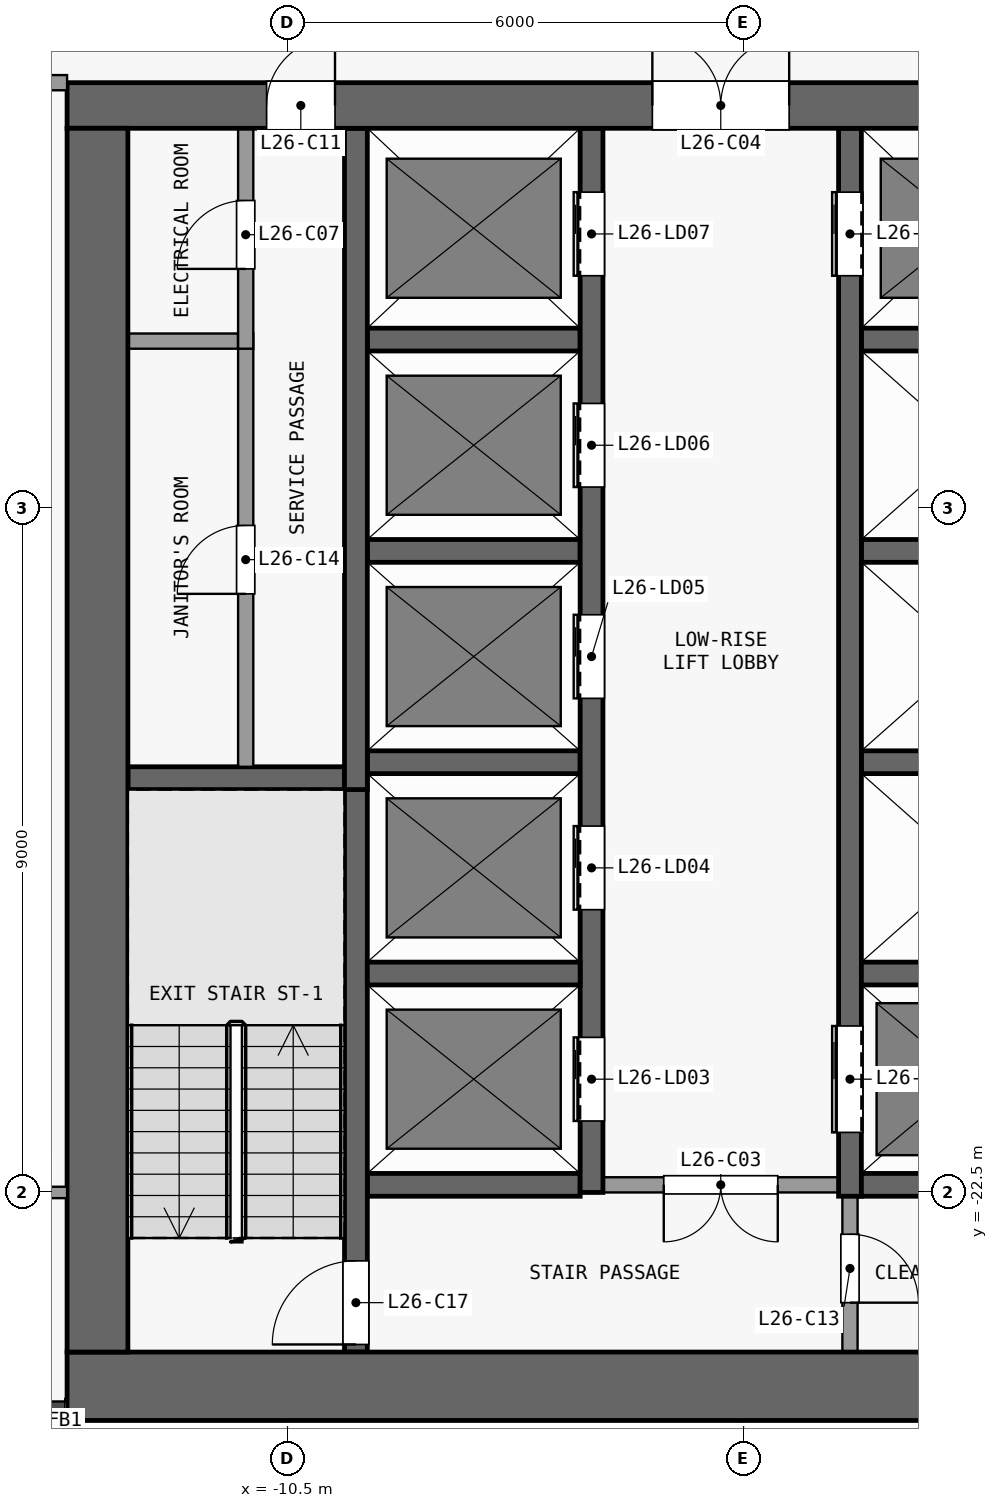
"""IFC4 building model, lengths in metres.
Left out: names, types, materials, properties, quantities, classifications, styles, units other than length and angle.
Written with IfcOpenShell. Run it as: python <this file> out.ifc"""

import sys

from ifc_helpers import new_model, si_unit, direction, frame, frame_2d, origin, place, context, subcontext, project, spatial, rectangle, extrude, element, fill, save


model = new_model("IFC4")
c1 = context("Model", 3, precision=1e-05, world=origin(), true_north=direction((0.0, 1.0)))
c2 = subcontext(c1, "Body", "Model", "MODEL_VIEW")
j1 = project(units=[si_unit("LENGTHUNIT", "METRE"), si_unit("PLANEANGLEUNIT", "RADIAN")], contexts=[c1])
p1 = place(None, origin())
s1 = spatial("IfcSite", under=j1, at=p1, CompositionType="ELEMENT")
p2 = place(p1, origin())
s2 = spatial("IfcBuilding", under=s1, at=p2, CompositionType="ELEMENT")
p3 = place(p2, frame((0.0, 0.0, 106.3)))
s3 = spatial("IfcBuildingStorey", under=s2, at=p3, CompositionType="ELEMENT", Elevation=106.3)
p4 = place(p3, frame((-13.4, -25.05, 0.0), z_axis=(0.0, 0.0, 1.0), x_axis=(1.0, 0.0, 0.0)))
e1 = element("IfcWall", 1, at=p4, inside=s3, PredefinedType="SHEAR", context=c2, shape_type="SweptSolid", body=[
    extrude(rectangle(XDim=26.8, YDim=0.9, at=frame_2d((13.4, 0.0))), origin(), (0.0, 0.0, 1.0), 3.3),
])
p5 = place(p3, frame((-13.4, -8.2, 0.0), z_axis=(0.0, 0.0, 1.0), x_axis=(1.0, 0.0, 0.0)))
e2 = element("IfcWall", 2, at=p5, inside=s3, PredefinedType="SHEAR", context=c2, shape_type="SweptSolid", body=[
    extrude(rectangle(XDim=26.8, YDim=0.6, at=frame_2d((13.4, 0.0))), origin(), (0.0, 0.0, 1.0), 3.3),
])
p6 = place(p5, frame((7.7, 0.0, 0.0)))
e3 = element("IfcOpeningElement", 3, at=p6, cuts=e2, PredefinedType="OPENING", context=c2, shape_type="SweptSolid", body=[
    extrude(rectangle(XDim=1.8, YDim=2.1, at=frame_2d((0.9, 1.05))), frame((0.0, 0.31, 0.0), z_axis=(0.0, -1.0, 0.0), x_axis=(1.0, 0.0, 0.0)), (0.0, 0.0, 1.0), 0.62),
])
p7 = place(p5, frame((17.3, 0.0, 0.0)))
e4 = element("IfcOpeningElement", 4, at=p7, cuts=e2, PredefinedType="OPENING", context=c2, shape_type="SweptSolid", body=[
    extrude(rectangle(XDim=1.8, YDim=2.1, at=frame_2d((0.9, 1.05))), frame((0.0, 0.31, 0.0), z_axis=(0.0, -1.0, 0.0), x_axis=(1.0, 0.0, 0.0)), (0.0, 0.0, 1.0), 0.62),
])
p8 = place(p5, frame((2.625, 0.0, 0.0)))
e5 = element("IfcOpeningElement", 5, at=p8, cuts=e2, PredefinedType="OPENING", context=c2, shape_type="SweptSolid", body=[
    extrude(rectangle(XDim=0.9, YDim=2.1, at=frame_2d((0.45, 1.05))), frame((0.0, 0.31, 0.0), z_axis=(0.0, -1.0, 0.0), x_axis=(1.0, 0.0, 0.0)), (0.0, 0.0, 1.0), 0.62),
])
p9 = place(p5, frame((23.275, 0.0, 0.0)))
e6 = element("IfcOpeningElement", 6, at=p9, cuts=e2, PredefinedType="OPENING", context=c2, shape_type="SweptSolid", body=[
    extrude(rectangle(XDim=0.9, YDim=2.1, at=frame_2d((0.45, 1.05))), frame((0.0, 0.31, 0.0), z_axis=(0.0, -1.0, 0.0), x_axis=(1.0, 0.0, 0.0)), (0.0, 0.0, 1.0), 0.62),
])
p10 = place(p3, frame((-13.0, -24.6, 0.0), z_axis=(0.0, 0.0, 1.0), x_axis=(0.0, 1.0, 0.0)))
e7 = element("IfcWall", 7, at=p10, inside=s3, PredefinedType="SHEAR", context=c2, shape_type="SweptSolid", body=[
    extrude(rectangle(XDim=16.1, YDim=0.8, at=frame_2d((8.05, 0.0))), origin(), (0.0, 0.0, 1.0), 3.3),
])
p11 = place(p3, frame((-9.45, -22.4, 0.0), z_axis=(0.0, 0.0, 1.0), x_axis=(1.0, 0.0, 0.0)))
e8 = element("IfcWall", 8, at=p11, inside=s3, PredefinedType="SHEAR", context=c2, shape_type="SweptSolid", body=[
    extrude(rectangle(XDim=2.8, YDim=0.3, at=frame_2d((1.4, 0.0))), origin(), (0.0, 0.0, 1.0), 3.3),
])
p12 = place(p3, frame((-3.25, -22.4, 0.0), z_axis=(0.0, 0.0, 1.0), x_axis=(-1.0, 0.0, 0.0)))
e9 = element("IfcWall", 9, at=p12, inside=s3, PredefinedType="PARTITIONING", context=c2, shape_type="SweptSolid", body=[
    extrude(rectangle(XDim=3.1, YDim=0.2, at=frame_2d((1.55, 0.0))), origin(), (0.0, 0.0, 1.0), 3.3),
])
p13 = place(p12, frame((0.8, 0.0, 0.0)))
e10 = element("IfcOpeningElement", 10, at=p13, cuts=e9, PredefinedType="OPENING", context=c2, shape_type="SweptSolid", body=[
    extrude(rectangle(XDim=1.5, YDim=2.1, at=frame_2d((0.75, 1.05))), frame((0.0, 0.11, 0.0), z_axis=(0.0, -1.0, 0.0), x_axis=(1.0, 0.0, 0.0)), (0.0, 0.0, 1.0), 0.22),
])
p14 = place(p3, frame((-2.95, -22.4, 0.0), z_axis=(0.0, 0.0, 1.0), x_axis=(1.0, 0.0, 0.0)))
e11 = element("IfcWall", 11, at=p14, inside=s3, PredefinedType="SHEAR", context=c2, shape_type="SweptSolid", body=[
    extrude(rectangle(XDim=6.2, YDim=0.3, at=frame_2d((3.1, 0.0))), origin(), (0.0, 0.0, 1.0), 3.3),
])
for number, where, z_axis, x_axis in (
    (12, (-9.45, -19.62, 0.0), (0.0, 0.0, 1.0), (1.0, 0.0, 0.0)),
    (13, (-2.95, -19.62, 0.0), (0.0, 0.0, 1.0), (1.0, 0.0, 0.0)),
):
    element("IfcWall", number, at=place(p3, frame(where, z_axis=z_axis, x_axis=x_axis)), inside=s3, PredefinedType="SHEAR", context=c2, shape_type="SweptSolid", body=[
        extrude(rectangle(XDim=2.8, YDim=0.3, at=frame_2d((1.4, 0.0))), origin(), (0.0, 0.0, 1.0), 3.3),
    ])
p15 = place(p3, frame((-12.6, -17.05, 0.0), z_axis=(0.0, 0.0, 1.0), x_axis=(1.0, 0.0, 0.0)))
e14 = element("IfcWall", 14, at=p15, inside=s3, PredefinedType="SHEAR", context=c2, shape_type="SweptSolid", body=[
    extrude(rectangle(XDim=2.85, YDim=0.3, at=frame_2d((1.425, 0.0))), origin(), (0.0, 0.0, 1.0), 3.3),
])
for number, where, z_axis, x_axis in (
    (15, (-9.45, -16.84, 0.0), (0.0, 0.0, 1.0), (1.0, 0.0, 0.0)),
    (16, (-2.95, -16.84, 0.0), (0.0, 0.0, 1.0), (1.0, 0.0, 0.0)),
    (17, (-9.45, -14.06, 0.0), (0.0, 0.0, 1.0), (1.0, 0.0, 0.0)),
    (18, (-2.95, -14.06, 0.0), (0.0, 0.0, 1.0), (1.0, 0.0, 0.0)),
):
    element("IfcWall", number, at=place(p3, frame(where, z_axis=z_axis, x_axis=x_axis)), inside=s3, PredefinedType="SHEAR", context=c2, shape_type="SweptSolid", body=[
        extrude(rectangle(XDim=2.8, YDim=0.3, at=frame_2d((1.4, 0.0))), origin(), (0.0, 0.0, 1.0), 3.3),
    ])
p16 = place(p3, frame((-12.6, -11.3, 0.0), z_axis=(0.0, 0.0, 1.0), x_axis=(1.0, 0.0, 0.0)))
e19 = element("IfcWall", 19, at=p16, inside=s3, PredefinedType="PARTITIONING", context=c2, shape_type="SweptSolid", body=[
    extrude(rectangle(XDim=1.45, YDim=0.2, at=frame_2d((0.725, 0.0))), origin(), (0.0, 0.0, 1.0), 3.3),
])
for number, where, z_axis, x_axis in (
    (20, (-9.45, -11.28, 0.0), (0.0, 0.0, 1.0), (1.0, 0.0, 0.0)),
    (21, (-2.95, -11.28, 0.0), (0.0, 0.0, 1.0), (1.0, 0.0, 0.0)),
):
    element("IfcWall", number, at=place(p3, frame(where, z_axis=z_axis, x_axis=x_axis)), inside=s3, PredefinedType="SHEAR", context=c2, shape_type="SweptSolid", body=[
        extrude(rectangle(XDim=2.8, YDim=0.3, at=frame_2d((1.4, 0.0))), origin(), (0.0, 0.0, 1.0), 3.3),
    ])
p17 = place(p3, frame((-11.05, -16.9, 0.0), z_axis=(0.0, 0.0, 1.0), x_axis=(0.0, 1.0, 0.0)))
e22 = element("IfcWall", 22, at=p17, inside=s3, PredefinedType="PARTITIONING", context=c2, shape_type="SweptSolid", body=[
    extrude(rectangle(XDim=5.7, YDim=0.2, at=frame_2d((2.85, 0.0))), origin(), (0.0, 0.0, 1.0), 3.3),
])
p18 = place(p17, frame((2.275, 0.0, 0.0)))
e23 = element("IfcOpeningElement", 23, at=p18, cuts=e22, PredefinedType="OPENING", context=c2, shape_type="SweptSolid", body=[
    extrude(rectangle(XDim=0.9, YDim=2.1, at=frame_2d((0.45, 1.05))), frame((0.0, 0.11, 0.0), z_axis=(0.0, -1.0, 0.0), x_axis=(1.0, 0.0, 0.0)), (0.0, 0.0, 1.0), 0.22),
])
p19 = place(p3, frame((-11.05, -11.4, 0.0), z_axis=(0.0, 0.0, 1.0), x_axis=(0.0, 1.0, 0.0)))
e24 = element("IfcWall", 24, at=p19, inside=s3, PredefinedType="PARTITIONING", context=c2, shape_type="SweptSolid", body=[
    extrude(rectangle(XDim=2.9, YDim=0.2, at=frame_2d((1.45, 0.0))), origin(), (0.0, 0.0, 1.0), 3.3),
])
p20 = place(p19, frame((1.05, 0.0, 0.0)))
e25 = element("IfcOpeningElement", 25, at=p20, cuts=e24, PredefinedType="OPENING", context=c2, shape_type="SweptSolid", body=[
    extrude(rectangle(XDim=0.9, YDim=2.1, at=frame_2d((0.45, 1.05))), frame((0.0, 0.11, 0.0), z_axis=(0.0, -1.0, 0.0), x_axis=(1.0, 0.0, 0.0)), (0.0, 0.0, 1.0), 0.22),
])
p21 = place(p3, frame((-9.6, -24.6, 0.0), z_axis=(0.0, 0.0, 1.0), x_axis=(0.0, 1.0, 0.0)))
e26 = element("IfcWall", 26, at=p21, inside=s3, PredefinedType="SHEAR", context=c2, shape_type="SweptSolid", body=[
    extrude(rectangle(XDim=7.7, YDim=0.3, at=frame_2d((3.85, 0.0))), origin(), (0.0, 0.0, 1.0), 3.3),
])
p22 = place(p21, frame((0.1, 0.0, 0.0)))
e27 = element("IfcOpeningElement", 27, at=p22, cuts=e26, PredefinedType="OPENING", context=c2, shape_type="SweptSolid", body=[
    extrude(rectangle(XDim=1.1, YDim=2.1, at=frame_2d((0.55, 1.05))), frame((0.0, 0.16, 0.0), z_axis=(0.0, -1.0, 0.0), x_axis=(1.0, 0.0, 0.0)), (0.0, 0.0, 1.0), 0.32),
])
p23 = place(p3, frame((-9.6, -17.2, 0.0), z_axis=(0.0, 0.0, 1.0), x_axis=(0.0, 1.0, 0.0)))
e28 = element("IfcWall", 28, at=p23, inside=s3, PredefinedType="SHEAR", context=c2, shape_type="SweptSolid", body=[
    extrude(rectangle(XDim=8.7, YDim=0.3, at=frame_2d((4.35, 0.0))), origin(), (0.0, 0.0, 1.0), 3.3),
])
p24 = place(p3, frame((-6.5, -22.5, 0.0), z_axis=(0.0, 0.0, 1.0), x_axis=(0.0, 1.0, 0.0)))
e29 = element("IfcWall", 29, at=p24, inside=s3, PredefinedType="SHEAR", context=c2, shape_type="SweptSolid", body=[
    extrude(rectangle(XDim=14.0, YDim=0.3, at=frame_2d((7.0, 0.0))), origin(), (0.0, 0.0, 1.0), 3.3),
])
p25 = place(p24, frame((0.94, 0.0, 0.0)))
e30 = element("IfcOpeningElement", 30, at=p25, cuts=e29, PredefinedType="OPENING", context=c2, shape_type="SweptSolid", body=[
    extrude(rectangle(XDim=1.1, YDim=2.1, at=frame_2d((0.55, 1.05))), frame((0.0, 0.16, 0.0), z_axis=(0.0, -1.0, 0.0), x_axis=(1.0, 0.0, 0.0)), (0.0, 0.0, 1.0), 0.32),
])
p26 = place(p24, frame((3.72, 0.0, 0.0)))
e31 = element("IfcOpeningElement", 31, at=p26, cuts=e29, PredefinedType="OPENING", context=c2, shape_type="SweptSolid", body=[
    extrude(rectangle(XDim=1.1, YDim=2.1, at=frame_2d((0.55, 1.05))), frame((0.0, 0.16, 0.0), z_axis=(0.0, -1.0, 0.0), x_axis=(1.0, 0.0, 0.0)), (0.0, 0.0, 1.0), 0.32),
])
p27 = place(p24, frame((6.5, 0.0, 0.0)))
e32 = element("IfcOpeningElement", 32, at=p27, cuts=e29, PredefinedType="OPENING", context=c2, shape_type="SweptSolid", body=[
    extrude(rectangle(XDim=1.1, YDim=2.1, at=frame_2d((0.55, 1.05))), frame((0.0, 0.16, 0.0), z_axis=(0.0, -1.0, 0.0), x_axis=(1.0, 0.0, 0.0)), (0.0, 0.0, 1.0), 0.32),
])
p28 = place(p24, frame((9.28, 0.0, 0.0)))
e33 = element("IfcOpeningElement", 33, at=p28, cuts=e29, PredefinedType="OPENING", context=c2, shape_type="SweptSolid", body=[
    extrude(rectangle(XDim=1.1, YDim=2.1, at=frame_2d((0.55, 1.05))), frame((0.0, 0.16, 0.0), z_axis=(0.0, -1.0, 0.0), x_axis=(1.0, 0.0, 0.0)), (0.0, 0.0, 1.0), 0.32),
])
p29 = place(p24, frame((12.06, 0.0, 0.0)))
e34 = element("IfcOpeningElement", 34, at=p29, cuts=e29, PredefinedType="OPENING", context=c2, shape_type="SweptSolid", body=[
    extrude(rectangle(XDim=1.1, YDim=2.1, at=frame_2d((0.55, 1.05))), frame((0.0, 0.16, 0.0), z_axis=(0.0, -1.0, 0.0), x_axis=(1.0, 0.0, 0.0)), (0.0, 0.0, 1.0), 0.32),
])
p30 = place(p3, frame((-3.1, -22.55, 0.0), z_axis=(0.0, 0.0, 1.0), x_axis=(0.0, -1.0, 0.0)))
e35 = element("IfcWall", 35, at=p30, inside=s3, PredefinedType="PARTITIONING", context=c2, shape_type="SweptSolid", body=[
    extrude(rectangle(XDim=2.05, YDim=0.2, at=frame_2d((1.025, 0.0))), origin(), (0.0, 0.0, 1.0), 3.3),
])
p31 = place(p30, frame((0.5, 0.0, 0.0)))
e36 = element("IfcOpeningElement", 36, at=p31, cuts=e35, PredefinedType="OPENING", context=c2, shape_type="SweptSolid", body=[
    extrude(rectangle(XDim=0.9, YDim=2.1, at=frame_2d((0.45, 1.05))), frame((0.0, 0.11, 0.0), z_axis=(0.0, -1.0, 0.0), x_axis=(1.0, 0.0, 0.0)), (0.0, 0.0, 1.0), 0.22),
])
p32 = place(p3, frame((-3.1, -22.55, 0.0), z_axis=(0.0, 0.0, 1.0), x_axis=(0.0, 1.0, 0.0)))
e37 = element("IfcWall", 37, at=p32, inside=s3, PredefinedType="SHEAR", context=c2, shape_type="SweptSolid", body=[
    extrude(rectangle(XDim=14.05, YDim=0.3, at=frame_2d((7.025, 0.0))), origin(), (0.0, 0.0, 1.0), 3.3),
])
p33 = place(p32, frame((12.11, 0.0, 0.0)))
e38 = element("IfcOpeningElement", 38, at=p33, cuts=e37, PredefinedType="OPENING", context=c2, shape_type="SweptSolid", body=[
    extrude(rectangle(XDim=1.1, YDim=2.1, at=frame_2d((0.55, 1.05))), frame((0.0, 0.16, 0.0), z_axis=(0.0, -1.0, 0.0), x_axis=(1.0, 0.0, 0.0)), (0.0, 0.0, 1.0), 0.32),
])
p34 = place(p32, frame((0.84, 0.0, 0.0)))
e39 = element("IfcOpeningElement", 39, at=p34, cuts=e37, PredefinedType="OPENING", context=c2, shape_type="SweptSolid", body=[
    extrude(rectangle(XDim=1.4, YDim=2.1, at=frame_2d((0.7, 1.05))), frame((0.0, 0.16, 0.0), z_axis=(0.0, -1.0, 0.0), x_axis=(1.0, 0.0, 0.0)), (0.0, 0.0, 1.0), 0.32),
])
p35 = place(p3, frame((-16.325, -22.5, 0.0), z_axis=(0.0, 0.0, 1.0), x_axis=(1.0, 0.0, 0.0)))
e40 = element("IfcWall", 40, at=p35, inside=s3, PredefinedType="PARTITIONING", context=c2, shape_type="SweptSolid", body=[
    extrude(rectangle(XDim=2.925, YDim=0.15, at=frame_2d((1.462, 0.0))), origin(), (0.0, 0.0, 1.0), 3.3),
])
p36 = place(p35, frame((1.0, 0.0, 0.0)))
e41 = element("IfcOpeningElement", 41, at=p36, cuts=e40, PredefinedType="OPENING", context=c2, shape_type="SweptSolid", body=[
    extrude(rectangle(XDim=0.9, YDim=2.1, at=frame_2d((0.45, 1.05))), frame((0.0, 0.085, 0.0), z_axis=(0.0, -1.0, 0.0), x_axis=(1.0, 0.0, 0.0)), (0.0, 0.0, 1.0), 0.17),
])
p37 = place(p3, frame((-25.25, -7.9, 0.0), z_axis=(0.0, 0.0, 1.0), x_axis=(1.0, 0.0, 0.0)))
e42 = element("IfcWall", 42, at=p37, inside=s3, PredefinedType="PARTITIONING", context=c2, shape_type="SweptSolid", body=[
    extrude(rectangle(XDim=11.85, YDim=0.2, at=frame_2d((5.925, 0.0))), origin(), (0.0, 0.0, 1.0), 3.3),
])
p38 = place(p37, frame((9.85, 0.0, 0.0)))
e43 = element("IfcOpeningElement", 43, at=p38, cuts=e42, PredefinedType="OPENING", context=c2, shape_type="SweptSolid", body=[
    extrude(rectangle(XDim=1.0, YDim=2.1, at=frame_2d((0.5, 1.05))), frame((0.0, 0.11, 0.0), z_axis=(0.0, -1.0, 0.0), x_axis=(1.0, 0.0, 0.0)), (0.0, 0.0, 1.0), 0.22),
])
p39 = place(p25, origin())
e44 = element("IfcDoor", 44, at=p39, inside=s3, OperationType="DOUBLE_DOOR_SLIDING", PredefinedType="DOOR", context=c2, shape_type="SweptSolid", body=[
    extrude(rectangle(XDim=1.1, YDim=2.1, at=frame_2d((0.55, 1.05))), frame((0.0, 0.025, 0.0), z_axis=(0.0, -1.0, 0.0), x_axis=(1.0, 0.0, 0.0)), (0.0, 0.0, 1.0), 0.05),
])
fill(e30, e44)
p40 = place(p26, origin())
e45 = element("IfcDoor", 45, at=p40, inside=s3, OperationType="DOUBLE_DOOR_SLIDING", PredefinedType="DOOR", context=c2, shape_type="SweptSolid", body=[
    extrude(rectangle(XDim=1.1, YDim=2.1, at=frame_2d((0.55, 1.05))), frame((0.0, 0.025, 0.0), z_axis=(0.0, -1.0, 0.0), x_axis=(1.0, 0.0, 0.0)), (0.0, 0.0, 1.0), 0.05),
])
fill(e31, e45)
p41 = place(p27, origin())
e46 = element("IfcDoor", 46, at=p41, inside=s3, OperationType="DOUBLE_DOOR_SLIDING", PredefinedType="DOOR", context=c2, shape_type="SweptSolid", body=[
    extrude(rectangle(XDim=1.1, YDim=2.1, at=frame_2d((0.55, 1.05))), frame((0.0, 0.025, 0.0), z_axis=(0.0, -1.0, 0.0), x_axis=(1.0, 0.0, 0.0)), (0.0, 0.0, 1.0), 0.05),
])
fill(e32, e46)
p42 = place(p28, origin())
e47 = element("IfcDoor", 47, at=p42, inside=s3, OperationType="DOUBLE_DOOR_SLIDING", PredefinedType="DOOR", context=c2, shape_type="SweptSolid", body=[
    extrude(rectangle(XDim=1.1, YDim=2.1, at=frame_2d((0.55, 1.05))), frame((0.0, 0.025, 0.0), z_axis=(0.0, -1.0, 0.0), x_axis=(1.0, 0.0, 0.0)), (0.0, 0.0, 1.0), 0.05),
])
fill(e33, e47)
p43 = place(p29, origin())
e48 = element("IfcDoor", 48, at=p43, inside=s3, OperationType="DOUBLE_DOOR_SLIDING", PredefinedType="DOOR", context=c2, shape_type="SweptSolid", body=[
    extrude(rectangle(XDim=1.1, YDim=2.1, at=frame_2d((0.55, 1.05))), frame((0.0, 0.025, 0.0), z_axis=(0.0, -1.0, 0.0), x_axis=(1.0, 0.0, 0.0)), (0.0, 0.0, 1.0), 0.05),
])
fill(e34, e48)
p44 = place(p33, origin())
e49 = element("IfcDoor", 49, at=p44, inside=s3, OperationType="DOUBLE_DOOR_SLIDING", PredefinedType="DOOR", context=c2, shape_type="SweptSolid", body=[
    extrude(rectangle(XDim=1.1, YDim=2.1, at=frame_2d((0.55, 1.05))), frame((0.0, 0.025, 0.0), z_axis=(0.0, -1.0, 0.0), x_axis=(1.0, 0.0, 0.0)), (0.0, 0.0, 1.0), 0.05),
])
fill(e38, e49)
p45 = place(p34, origin())
e50 = element("IfcDoor", 50, at=p45, inside=s3, OperationType="DOUBLE_DOOR_SLIDING", PredefinedType="DOOR", context=c2, shape_type="SweptSolid", body=[
    extrude(rectangle(XDim=1.4, YDim=2.1, at=frame_2d((0.7, 1.05))), frame((0.0, 0.025, 0.0), z_axis=(0.0, -1.0, 0.0), x_axis=(1.0, 0.0, 0.0)), (0.0, 0.0, 1.0), 0.05),
])
fill(e39, e50)
p46 = place(p13, origin())
e51 = element("IfcDoor", 51, at=p46, inside=s3, OperationType="DOUBLE_DOOR_SINGLE_SWING", PredefinedType="DOOR", context=c2, shape_type="SweptSolid", body=[
    extrude(rectangle(XDim=1.5, YDim=2.1, at=frame_2d((0.75, 1.05))), frame((0.0, 0.025, 0.0), z_axis=(0.0, -1.0, 0.0), x_axis=(1.0, 0.0, 0.0)), (0.0, 0.0, 1.0), 0.05),
])
fill(e10, e51)
p47 = place(p6, origin())
e52 = element("IfcDoor", 52, at=p47, inside=s3, OperationType="DOUBLE_DOOR_SINGLE_SWING", PredefinedType="DOOR", context=c2, shape_type="SweptSolid", body=[
    extrude(rectangle(XDim=1.8, YDim=2.1, at=frame_2d((0.9, 1.05))), frame((0.0, 0.025, 0.0), z_axis=(0.0, -1.0, 0.0), x_axis=(1.0, 0.0, 0.0)), (0.0, 0.0, 1.0), 0.05),
])
fill(e3, e52)
p48 = place(p20, origin())
e53 = element("IfcDoor", 53, at=p48, inside=s3, OperationType="SINGLE_SWING_LEFT", PredefinedType="DOOR", context=c2, shape_type="SweptSolid", body=[
    extrude(rectangle(XDim=0.9, YDim=2.1, at=frame_2d((0.45, 1.05))), frame((0.0, 0.025, 0.0), z_axis=(0.0, -1.0, 0.0), x_axis=(1.0, 0.0, 0.0)), (0.0, 0.0, 1.0), 0.05),
])
fill(e25, e53)
p49 = place(p8, origin())
e54 = element("IfcDoor", 54, at=p49, inside=s3, OperationType="SINGLE_SWING_RIGHT", PredefinedType="DOOR", context=c2, shape_type="SweptSolid", body=[
    extrude(rectangle(XDim=0.9, YDim=2.1, at=frame_2d((0.45, 1.05))), frame((0.0, 0.025, 0.0), z_axis=(0.0, -1.0, 0.0), x_axis=(1.0, 0.0, 0.0)), (0.0, 0.0, 1.0), 0.05),
])
fill(e5, e54)
p50 = place(p31, origin())
e55 = element("IfcDoor", 55, at=p50, inside=s3, OperationType="SINGLE_SWING_RIGHT", PredefinedType="DOOR", context=c2, shape_type="SweptSolid", body=[
    extrude(rectangle(XDim=0.9, YDim=2.1, at=frame_2d((0.45, 1.05))), frame((0.0, 0.025, 0.0), z_axis=(0.0, -1.0, 0.0), x_axis=(1.0, 0.0, 0.0)), (0.0, 0.0, 1.0), 0.05),
])
fill(e36, e55)
p51 = place(p18, origin())
e56 = element("IfcDoor", 56, at=p51, inside=s3, OperationType="SINGLE_SWING_LEFT", PredefinedType="DOOR", context=c2, shape_type="SweptSolid", body=[
    extrude(rectangle(XDim=0.9, YDim=2.1, at=frame_2d((0.45, 1.05))), frame((0.0, 0.025, 0.0), z_axis=(0.0, -1.0, 0.0), x_axis=(1.0, 0.0, 0.0)), (0.0, 0.0, 1.0), 0.05),
])
fill(e23, e56)
p52 = place(p22, origin())
e57 = element("IfcDoor", 57, at=p52, inside=s3, OperationType="SINGLE_SWING_LEFT", PredefinedType="DOOR", context=c2, shape_type="SweptSolid", body=[
    extrude(rectangle(XDim=1.1, YDim=2.1, at=frame_2d((0.55, 1.05))), frame((0.0, 0.025, 0.0), z_axis=(0.0, -1.0, 0.0), x_axis=(1.0, 0.0, 0.0)), (0.0, 0.0, 1.0), 0.05),
])
fill(e27, e57)
save(model, sys.argv[1])
